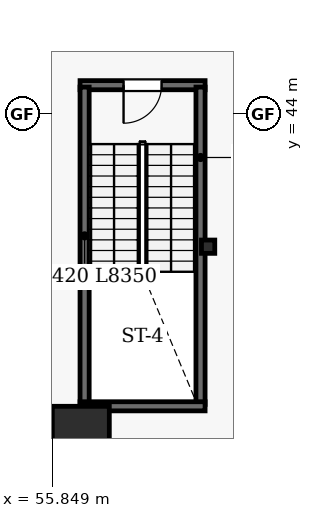
"""IFC4 building model, lengths in metres.
Left out: names, types, materials, properties, quantities, classifications, styles, units other than length and angle.
Written with IfcOpenShell. Run it as: python <this file> out.ifc"""

import sys

from ifc_helpers import new_model, si_unit, direction, frame, frame_2d, origin, origin_2d, place, context, subcontext, project, spatial, rectangle, i_section, extrude, element, fill, save


model = new_model("IFC4")
c1 = context("Model", 3, precision=1e-05, world=origin(), true_north=direction((0.0, 1.0)))
c2 = subcontext(c1, "Body", "Model", "MODEL_VIEW")
j1 = project(units=[si_unit("LENGTHUNIT", "METRE"), si_unit("PLANEANGLEUNIT", "RADIAN")], contexts=[c1])
p1 = place(None, origin())
s1 = spatial("IfcSite", under=j1, at=p1, CompositionType="ELEMENT")
p2 = place(p1, origin())
s2 = spatial("IfcBuilding", under=s1, at=p2, CompositionType="ELEMENT")
p3 = place(p2, origin())
s3 = spatial("IfcBuildingStorey", under=s2, at=p3, CompositionType="ELEMENT", Elevation=0.0)
p4 = place(p3, frame((56.6, 35.8, 0.0), z_axis=(0.0, 0.0, 1.0), x_axis=(1.0, 0.0, 0.0)))
e1 = element("IfcColumn", 1, at=p4, inside=s3, PredefinedType="COLUMN", context=c2, shape_type="SweptSolid", body=[
    extrude(rectangle(XDim=1.5, YDim=1.0, at=origin_2d()), origin(), (0.0, 0.0, 1.0), 4.8),
])
p5 = place(p3, frame((59.95, 40.5, 0.0), z_axis=(0.0, 0.0, 1.0), x_axis=(1.0, 0.0, 0.0)))
e2 = element("IfcColumn", 2, at=p5, inside=s3, PredefinedType="PILASTER", context=c2, shape_type="SweptSolid", body=[
    extrude(i_section(OverallWidth=0.35, OverallDepth=0.35, WebThickness=0.012, FlangeThickness=0.019, FilletRadius=0.02, at=origin_2d()), origin(), (0.0, 0.0, 1.0), 4.8),
])
p6 = place(p3, frame((56.58, 44.75, 0.0), z_axis=(0.0, 0.0, 1.0), x_axis=(1.0, 0.0, 0.0)))
e3 = element("IfcWall", 3, at=p6, inside=s3, PredefinedType="SHEAR", context=c2, shape_type="SweptSolid", body=[
    extrude(rectangle(XDim=3.29, YDim=0.24, at=frame_2d((1.645, 0.0))), origin(), (0.0, 0.0, 1.0), 4.5),
])
p7 = place(p6, frame((1.145, 0.0, 0.0)))
e4 = element("IfcOpeningElement", 4, at=p7, cuts=e3, PredefinedType="OPENING", context=c2, shape_type="SweptSolid", body=[
    extrude(rectangle(XDim=1.0, YDim=2.15, at=frame_2d((0.5, 1.075))), frame((0.0, 0.13, 0.0), z_axis=(0.0, -1.0, 0.0), x_axis=(1.0, 0.0, 0.0)), (0.0, 0.0, 1.0), 0.26),
])
for number, where, z_axis, x_axis in (
    (5, (56.7, 36.35, 0.0), (0.0, 0.0, 1.0), (0.0, 1.0, 0.0)),
    (6, (59.75, 36.35, 0.0), (0.0, 0.0, 1.0), (0.0, 1.0, 0.0)),
):
    element("IfcWall", number, at=place(p3, frame(where, z_axis=z_axis, x_axis=x_axis)), inside=s3, PredefinedType="SHEAR", context=c2, shape_type="SweptSolid", body=[
        extrude(rectangle(XDim=8.35, YDim=0.24, at=frame_2d((4.175, 0.0))), origin(), (0.0, 0.0, 1.0), 4.5),
    ])
p8 = place(p3, frame((56.58, 36.3, 0.0), z_axis=(0.0, 0.0, 1.0), x_axis=(1.0, 0.0, 0.0)))
e7 = element("IfcWall", 7, at=p8, inside=s3, PredefinedType="SHEAR", context=c2, shape_type="SweptSolid", body=[
    extrude(rectangle(XDim=3.29, YDim=0.24, at=frame_2d((1.645, 0.0))), origin(), (0.0, 0.0, 1.0), 4.5),
])
p9 = place(p7, frame((1.0, 0.0, 0.0), z_axis=(0.0, 0.0, 1.0), x_axis=(-1.0, 0.0, 0.0)))
e8 = element("IfcDoor", 8, at=p9, inside=s3, OperationType="SINGLE_SWING_LEFT", PredefinedType="DOOR", context=c2, shape_type="SweptSolid", body=[
    extrude(rectangle(XDim=1.0, YDim=2.15, at=frame_2d((0.5, 1.075))), frame((0.0, 0.025, 0.0), z_axis=(0.0, -1.0, 0.0), x_axis=(1.0, 0.0, 0.0)), (0.0, 0.0, 1.0), 0.05),
])
fill(e4, e8)
save(model, sys.argv[1])
